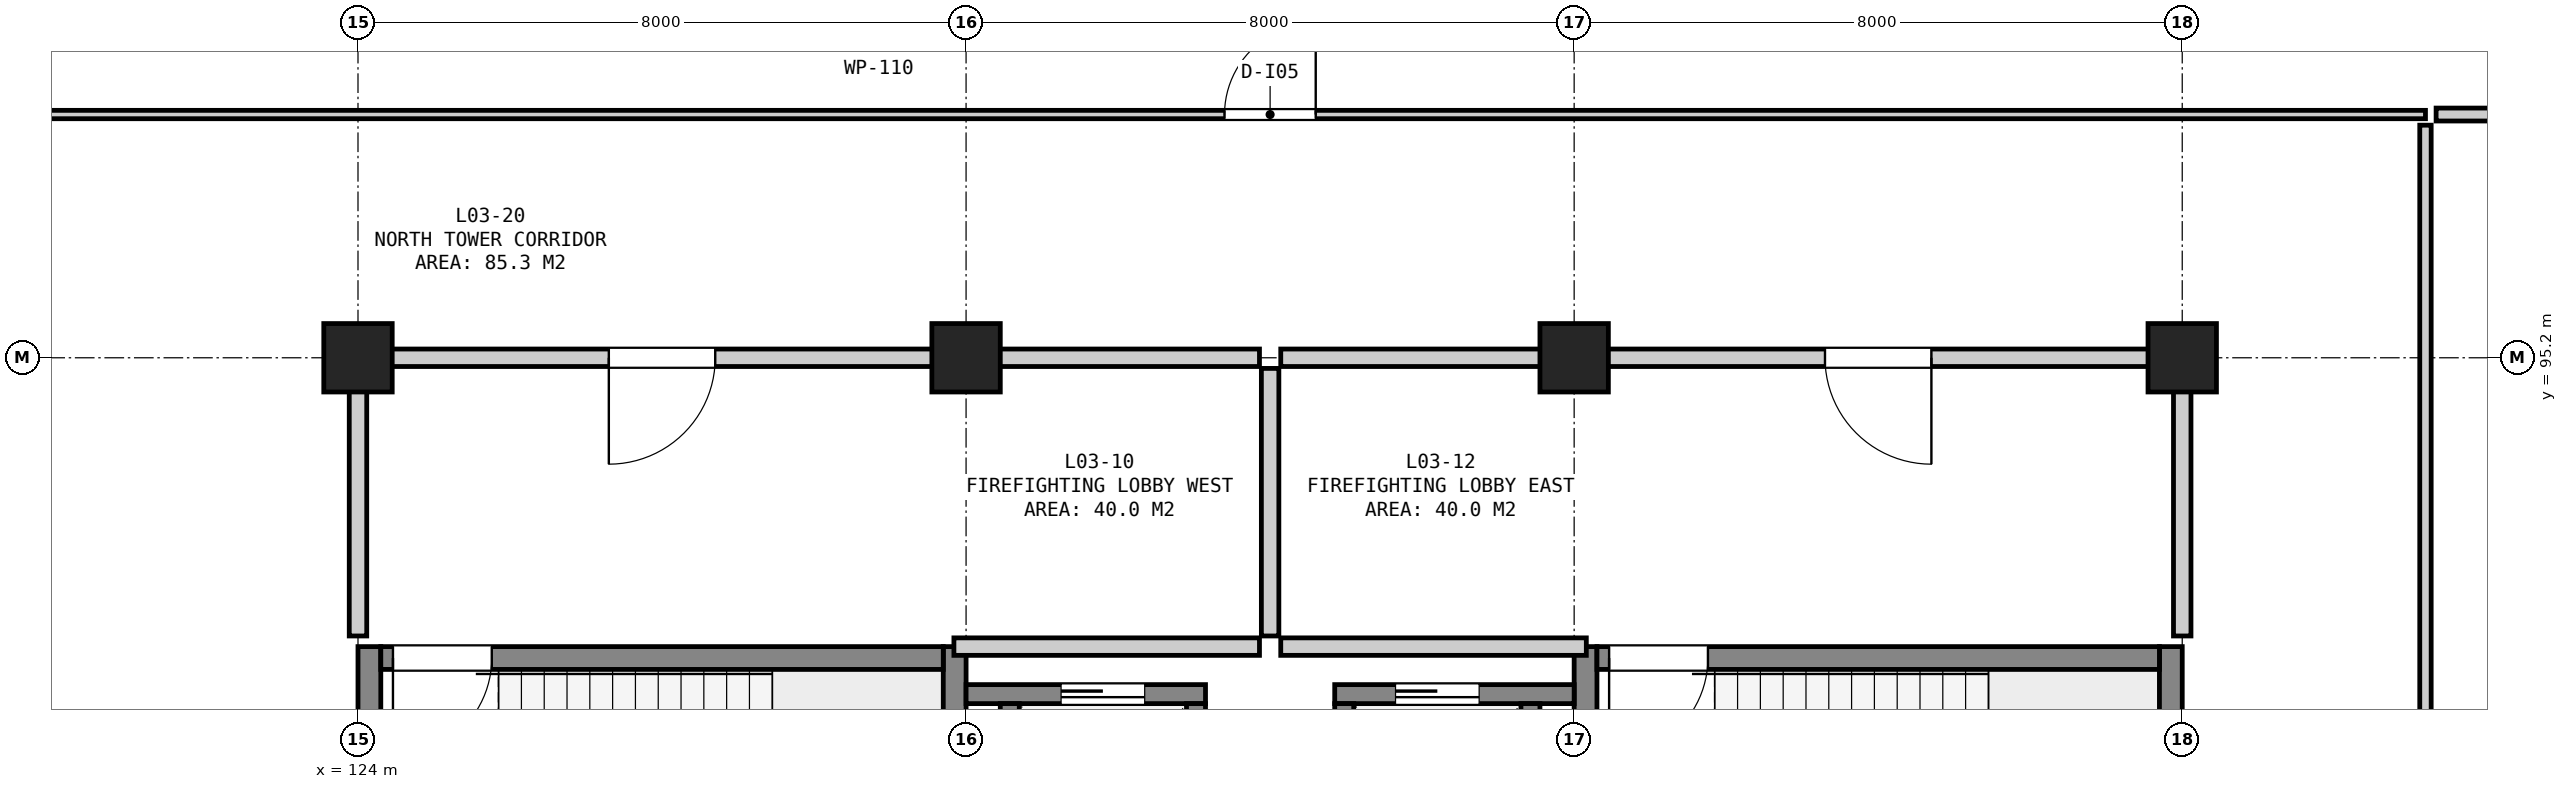
"""IFC4 building model, lengths in metres.
Left out: names, types, materials, properties, quantities, classifications, styles, units other than length and angle.
Written with IfcOpenShell. Run it as: python <this file> out.ifc"""

import sys

from ifc_helpers import new_model, si_unit, direction, frame, frame_2d, origin, origin_2d, place, context, subcontext, project, spatial, rectangle, extrude, element, fill, save


model = new_model("IFC4")
c1 = context("Model", 3, precision=1e-05, world=origin(), true_north=direction((0.0, 1.0)))
c2 = subcontext(c1, "Body", "Model", "MODEL_VIEW")
j1 = project(units=[si_unit("LENGTHUNIT", "METRE"), si_unit("PLANEANGLEUNIT", "RADIAN")], contexts=[c1])
p1 = place(None, origin())
s1 = spatial("IfcSite", under=j1, at=p1, CompositionType="ELEMENT")
p2 = place(p1, origin())
s2 = spatial("IfcBuilding", under=s1, at=p2, CompositionType="ELEMENT")
p3 = place(p2, frame((0.0, 0.0, 15.6)))
s3 = spatial("IfcBuildingStorey", under=s2, at=p3, CompositionType="ELEMENT", Elevation=15.6)
for number, where, z_axis, x_axis in (
    (1, (124.0, 95.2, 0.0), (0.0, 0.0, 1.0), (1.0, 0.0, 0.0)),
    (2, (132.0, 95.2, 0.0), (0.0, 0.0, 1.0), (1.0, 0.0, 0.0)),
    (3, (140.0, 95.2, 0.0), (0.0, 0.0, 1.0), (1.0, 0.0, 0.0)),
    (4, (148.0, 95.2, 0.0), (0.0, 0.0, 1.0), (1.0, 0.0, 0.0)),
):
    element("IfcColumn", number, at=place(p3, frame(where, z_axis=z_axis, x_axis=x_axis)), inside=s3, PredefinedType="COLUMN", context=c2, shape_type="SweptSolid", body=[
        extrude(rectangle(XDim=0.9, YDim=0.9, at=origin_2d()), origin(), (0.0, 0.0, 1.0), 4.2),
    ])
for number, where, z_axis, x_axis in (
    (5, (124.15, 87.2, 0.0), (0.0, 0.0, 1.0), (0.0, 1.0, 0.0)),
    (6, (131.85, 87.2, 0.0), (0.0, 0.0, 1.0), (0.0, 1.0, 0.0)),
):
    element("IfcWall", number, at=place(p3, frame(where, z_axis=z_axis, x_axis=x_axis)), inside=s3, PredefinedType="SHEAR", context=c2, shape_type="SweptSolid", body=[
        extrude(rectangle(XDim=4.2, YDim=0.3, at=frame_2d((2.1, 0.0))), origin(), (0.0, 0.0, 1.0), 3.9),
    ])
p4 = place(p3, frame((124.3, 91.25, 0.0), z_axis=(0.0, 0.0, 1.0), x_axis=(1.0, 0.0, 0.0)))
e7 = element("IfcWall", 7, at=p4, inside=s3, PredefinedType="SHEAR", context=c2, shape_type="SweptSolid", body=[
    extrude(rectangle(XDim=7.4, YDim=0.3, at=frame_2d((3.7, 0.0))), origin(), (0.0, 0.0, 1.0), 3.9),
])
p5 = place(p4, frame((0.16, 0.0, 0.0)))
e8 = element("IfcOpeningElement", 8, at=p5, cuts=e7, PredefinedType="OPENING", context=c2, shape_type="SweptSolid", body=[
    extrude(rectangle(XDim=1.3, YDim=2.18, at=frame_2d((0.65, 1.09))), frame((0.0, 0.162, 0.0), z_axis=(0.0, -1.0, 0.0), x_axis=(1.0, 0.0, 0.0)), (0.0, 0.0, 1.0), 0.324),
])
for number, where, z_axis, x_axis in (
    (9, (140.15, 87.2, 0.0), (0.0, 0.0, 1.0), (0.0, 1.0, 0.0)),
    (10, (147.85, 87.2, 0.0), (0.0, 0.0, 1.0), (0.0, 1.0, 0.0)),
):
    element("IfcWall", number, at=place(p3, frame(where, z_axis=z_axis, x_axis=x_axis)), inside=s3, PredefinedType="SHEAR", context=c2, shape_type="SweptSolid", body=[
        extrude(rectangle(XDim=4.2, YDim=0.3, at=frame_2d((2.1, 0.0))), origin(), (0.0, 0.0, 1.0), 3.9),
    ])
p6 = place(p3, frame((140.3, 91.25, 0.0), z_axis=(0.0, 0.0, 1.0), x_axis=(1.0, 0.0, 0.0)))
e11 = element("IfcWall", 11, at=p6, inside=s3, PredefinedType="SHEAR", context=c2, shape_type="SweptSolid", body=[
    extrude(rectangle(XDim=7.4, YDim=0.3, at=frame_2d((3.7, 0.0))), origin(), (0.0, 0.0, 1.0), 3.9),
])
p7 = place(p6, frame((0.16, 0.0, 0.0)))
e12 = element("IfcOpeningElement", 12, at=p7, cuts=e11, PredefinedType="OPENING", context=c2, shape_type="SweptSolid", body=[
    extrude(rectangle(XDim=1.3, YDim=2.18, at=frame_2d((0.65, 1.09))), frame((0.0, 0.162, 0.0), z_axis=(0.0, -1.0, 0.0), x_axis=(1.0, 0.0, 0.0)), (0.0, 0.0, 1.0), 0.324),
])
p8 = place(p3, frame((132.0, 90.775, 0.0), z_axis=(0.0, 0.0, 1.0), x_axis=(1.0, 0.0, 0.0)))
e13 = element("IfcWall", 13, at=p8, inside=s3, PredefinedType="SHEAR", context=c2, shape_type="SweptSolid", body=[
    extrude(rectangle(XDim=3.15, YDim=0.25, at=frame_2d((1.575, 0.0))), origin(), (0.0, 0.0, 1.0), 3.9),
])
p9 = place(p8, frame((1.25, 0.0, 0.0)))
e14 = element("IfcOpeningElement", 14, at=p9, cuts=e13, PredefinedType="OPENING", context=c2, shape_type="SweptSolid", body=[
    extrude(rectangle(XDim=1.1, YDim=2.15, at=frame_2d((0.55, 1.075))), frame((0.0, 0.137, 0.0), z_axis=(0.0, -1.0, 0.0), x_axis=(1.0, 0.0, 0.0)), (0.0, 0.0, 1.0), 0.274),
])
for number, where, z_axis, x_axis in (
    (15, (132.575, 87.75, 0.0), (0.0, 0.0, 1.0), (0.0, 1.0, 0.0)),
    (16, (135.025, 87.75, 0.0), (0.0, 0.0, 1.0), (0.0, 1.0, 0.0)),
):
    element("IfcWall", number, at=place(p3, frame(where, z_axis=z_axis, x_axis=x_axis)), inside=s3, PredefinedType="SHEAR", context=c2, shape_type="SweptSolid", body=[
        extrude(rectangle(XDim=2.9, YDim=0.25, at=frame_2d((1.45, 0.0))), origin(), (0.0, 0.0, 1.0), 3.9),
    ])
p10 = place(p3, frame((136.85, 90.775, 0.0), z_axis=(0.0, 0.0, 1.0), x_axis=(1.0, 0.0, 0.0)))
e17 = element("IfcWall", 17, at=p10, inside=s3, PredefinedType="SHEAR", context=c2, shape_type="SweptSolid", body=[
    extrude(rectangle(XDim=3.15, YDim=0.25, at=frame_2d((1.575, 0.0))), origin(), (0.0, 0.0, 1.0), 3.9),
])
p11 = place(p10, frame((0.8, 0.0, 0.0)))
e18 = element("IfcOpeningElement", 18, at=p11, cuts=e17, PredefinedType="OPENING", context=c2, shape_type="SweptSolid", body=[
    extrude(rectangle(XDim=1.1, YDim=2.15, at=frame_2d((0.55, 1.075))), frame((0.0, 0.137, 0.0), z_axis=(0.0, -1.0, 0.0), x_axis=(1.0, 0.0, 0.0)), (0.0, 0.0, 1.0), 0.274),
])
for number, where, z_axis, x_axis in (
    (19, (136.975, 87.75, 0.0), (0.0, 0.0, 1.0), (0.0, 1.0, 0.0)),
    (20, (139.425, 87.75, 0.0), (0.0, 0.0, 1.0), (0.0, 1.0, 0.0)),
):
    element("IfcWall", number, at=place(p3, frame(where, z_axis=z_axis, x_axis=x_axis)), inside=s3, PredefinedType="SHEAR", context=c2, shape_type="SweptSolid", body=[
        extrude(rectangle(XDim=2.9, YDim=0.25, at=frame_2d((1.45, 0.0))), origin(), (0.0, 0.0, 1.0), 3.9),
    ])
p12 = place(p3, frame((131.84, 91.4, 0.0), z_axis=(0.0, 0.0, 1.0), x_axis=(1.0, 0.0, 0.0)))
e21 = element("IfcWall", 21, at=p12, inside=s3, PredefinedType="SOLIDWALL", context=c2, shape_type="SweptSolid", body=[
    extrude(rectangle(XDim=4.02, YDim=0.23, at=frame_2d((2.01, 0.0))), origin(), (0.0, 0.0, 1.0), 3.9),
])
p13 = place(p3, frame((124.14, 95.2, 0.0), z_axis=(0.0, 0.0, 1.0), x_axis=(1.0, 0.0, 0.0)))
e22 = element("IfcWall", 22, at=p13, inside=s3, PredefinedType="SOLIDWALL", context=c2, shape_type="SweptSolid", body=[
    extrude(rectangle(XDim=11.72, YDim=0.23, at=frame_2d((5.86, 0.0))), origin(), (0.0, 0.0, 1.0), 3.195),
])
p14 = place(p13, frame((3.16, 0.0, 0.0)))
e23 = element("IfcOpeningElement", 23, at=p14, cuts=e22, PredefinedType="OPENING", context=c2, shape_type="SweptSolid", body=[
    extrude(rectangle(XDim=1.4, YDim=2.2, at=frame_2d((0.7, 1.1))), frame((0.0, 0.127, 0.0), z_axis=(0.0, -1.0, 0.0), x_axis=(1.0, 0.0, 0.0)), (0.0, 0.0, 1.0), 0.254),
])
p15 = place(p3, frame((124.0, 91.54, 0.0), z_axis=(0.0, 0.0, 1.0), x_axis=(0.0, 1.0, 0.0)))
e24 = element("IfcWall", 24, at=p15, inside=s3, PredefinedType="SOLIDWALL", context=c2, shape_type="SweptSolid", body=[
    extrude(rectangle(XDim=3.52, YDim=0.23, at=frame_2d((1.76, 0.0))), origin(), (0.0, 0.0, 1.0), 3.145),
])
p16 = place(p3, frame((136.0, 91.54, 0.0), z_axis=(0.0, 0.0, 1.0), x_axis=(0.0, 1.0, 0.0)))
e25 = element("IfcWall", 25, at=p16, inside=s3, PredefinedType="SOLIDWALL", context=c2, shape_type="SweptSolid", body=[
    extrude(rectangle(XDim=3.52, YDim=0.23, at=frame_2d((1.76, 0.0))), origin(), (0.0, 0.0, 1.0), 3.9),
])
p17 = place(p3, frame((136.14, 91.4, 0.0), z_axis=(0.0, 0.0, 1.0), x_axis=(1.0, 0.0, 0.0)))
e26 = element("IfcWall", 26, at=p17, inside=s3, PredefinedType="SOLIDWALL", context=c2, shape_type="SweptSolid", body=[
    extrude(rectangle(XDim=4.02, YDim=0.23, at=frame_2d((2.01, 0.0))), origin(), (0.0, 0.0, 1.0), 3.9),
])
p18 = place(p3, frame((136.14, 95.2, 0.0), z_axis=(0.0, 0.0, 1.0), x_axis=(1.0, 0.0, 0.0)))
e27 = element("IfcWall", 27, at=p18, inside=s3, PredefinedType="SOLIDWALL", context=c2, shape_type="SweptSolid", body=[
    extrude(rectangle(XDim=11.72, YDim=0.23, at=frame_2d((5.86, 0.0))), origin(), (0.0, 0.0, 1.0), 3.245),
])
p19 = place(p18, frame((7.16, 0.0, 0.0)))
e28 = element("IfcOpeningElement", 28, at=p19, cuts=e27, PredefinedType="OPENING", context=c2, shape_type="SweptSolid", body=[
    extrude(rectangle(XDim=1.4, YDim=2.2, at=frame_2d((0.7, 1.1))), frame((0.0, 0.127, 0.0), z_axis=(0.0, -1.0, 0.0), x_axis=(1.0, 0.0, 0.0)), (0.0, 0.0, 1.0), 0.254),
])
p20 = place(p3, frame((148.0, 91.54, 0.0), z_axis=(0.0, 0.0, 1.0), x_axis=(0.0, 1.0, 0.0)))
e29 = element("IfcWall", 29, at=p20, inside=s3, PredefinedType="SOLIDWALL", context=c2, shape_type="SweptSolid", body=[
    extrude(rectangle(XDim=3.52, YDim=0.23, at=frame_2d((1.76, 0.0))), origin(), (0.0, 0.0, 1.0), 3.095),
])
p21 = place(p3, frame((151.34, 98.4, 0.0), z_axis=(0.0, 0.0, 1.0), x_axis=(1.0, 0.0, 0.0)))
e30 = element("IfcWall", 30, at=p21, inside=s3, PredefinedType="PARTITIONING", context=c2, shape_type="SweptSolid", body=[
    extrude(rectangle(XDim=16.555, YDim=0.17, at=frame_2d((8.277, 0.0))), origin(), (0.0, 0.0, 1.0), 3.9),
])
p22 = place(p3, frame((151.2, 76.14, 0.0), z_axis=(0.0, 0.0, 1.0), x_axis=(0.0, 1.0, 0.0)))
e31 = element("IfcWall", 31, at=p22, inside=s3, PredefinedType="PARTITIONING", context=c2, shape_type="SweptSolid", body=[
    extrude(rectangle(XDim=22.12, YDim=0.15, at=frame_2d((11.06, 0.0))), origin(), (0.0, 0.0, 1.0), 3.9),
])
p23 = place(p22, frame((10.46, 0.0, 0.0)))
e32 = element("IfcOpeningElement", 32, at=p23, cuts=e31, PredefinedType="OPENING", context=c2, shape_type="SweptSolid", body=[
    extrude(rectangle(XDim=1.2, YDim=2.15, at=frame_2d((0.6, 1.075))), frame((0.0, 0.087, 0.0), z_axis=(0.0, -1.0, 0.0), x_axis=(1.0, 0.0, 0.0)), (0.0, 0.0, 1.0), 0.174),
])
p24 = place(p3, frame((110.505, 98.4, 0.0), z_axis=(0.0, 0.0, 1.0), x_axis=(1.0, 0.0, 0.0)))
e33 = element("IfcWall", 33, at=p24, inside=s3, PredefinedType="PARTITIONING", context=c2, shape_type="SweptSolid", body=[
    extrude(rectangle(XDim=40.695, YDim=0.11, at=frame_2d((20.348, 0.0))), origin(), (0.0, 0.0, 1.0), 3.9),
])
p25 = place(p24, frame((24.895, 0.0, 0.0)))
e34 = element("IfcOpeningElement", 34, at=p25, cuts=e33, PredefinedType="OPENING", context=c2, shape_type="SweptSolid", body=[
    extrude(rectangle(XDim=1.2, YDim=2.15, at=frame_2d((0.6, 1.075))), frame((0.0, 0.067, 0.0), z_axis=(0.0, -1.0, 0.0), x_axis=(1.0, 0.0, 0.0)), (0.0, 0.0, 1.0), 0.134),
])
p26 = place(p5, frame((1.3, 0.0, 0.0), z_axis=(0.0, 0.0, 1.0), x_axis=(-1.0, 0.0, 0.0)))
e35 = element("IfcDoor", 35, at=p26, inside=s3, OperationType="SINGLE_SWING_RIGHT", PredefinedType="DOOR", context=c2, shape_type="SweptSolid", body=[
    extrude(rectangle(XDim=1.3, YDim=2.18, at=frame_2d((0.65, 1.09))), frame((0.0, 0.025, 0.0), z_axis=(0.0, -1.0, 0.0), x_axis=(1.0, 0.0, 0.0)), (0.0, 0.0, 1.0), 0.05),
])
fill(e8, e35)
p27 = place(p7, frame((1.3, 0.0, 0.0), z_axis=(0.0, 0.0, 1.0), x_axis=(-1.0, 0.0, 0.0)))
e36 = element("IfcDoor", 36, at=p27, inside=s3, OperationType="SINGLE_SWING_RIGHT", PredefinedType="DOOR", context=c2, shape_type="SweptSolid", body=[
    extrude(rectangle(XDim=1.3, YDim=2.18, at=frame_2d((0.65, 1.09))), frame((0.0, 0.025, 0.0), z_axis=(0.0, -1.0, 0.0), x_axis=(1.0, 0.0, 0.0)), (0.0, 0.0, 1.0), 0.05),
])
fill(e12, e36)
p28 = place(p9, origin())
e37 = element("IfcDoor", 37, at=p28, inside=s3, OperationType="SLIDING_TO_LEFT", PredefinedType="DOOR", context=c2, shape_type="SweptSolid", body=[
    extrude(rectangle(XDim=1.1, YDim=2.15, at=frame_2d((0.55, 1.075))), frame((0.0, 0.025, 0.0), z_axis=(0.0, -1.0, 0.0), x_axis=(1.0, 0.0, 0.0)), (0.0, 0.0, 1.0), 0.05),
])
fill(e14, e37)
p29 = place(p11, origin())
e38 = element("IfcDoor", 38, at=p29, inside=s3, OperationType="SLIDING_TO_LEFT", PredefinedType="DOOR", context=c2, shape_type="SweptSolid", body=[
    extrude(rectangle(XDim=1.1, YDim=2.15, at=frame_2d((0.55, 1.075))), frame((0.0, 0.025, 0.0), z_axis=(0.0, -1.0, 0.0), x_axis=(1.0, 0.0, 0.0)), (0.0, 0.0, 1.0), 0.05),
])
fill(e18, e38)
p30 = place(p14, frame((1.4, 0.0, 0.0), z_axis=(0.0, 0.0, 1.0), x_axis=(-1.0, 0.0, 0.0)))
e39 = element("IfcDoor", 39, at=p30, inside=s3, OperationType="SINGLE_SWING_RIGHT", PredefinedType="DOOR", context=c2, shape_type="SweptSolid", body=[
    extrude(rectangle(XDim=1.4, YDim=2.2, at=frame_2d((0.7, 1.1))), frame((0.0, 0.025, 0.0), z_axis=(0.0, -1.0, 0.0), x_axis=(1.0, 0.0, 0.0)), (0.0, 0.0, 1.0), 0.05),
])
fill(e23, e39)
p31 = place(p19, frame((1.4, 0.0, 0.0), z_axis=(0.0, 0.0, 1.0), x_axis=(-1.0, 0.0, 0.0)))
e40 = element("IfcDoor", 40, at=p31, inside=s3, OperationType="SINGLE_SWING_LEFT", PredefinedType="DOOR", context=c2, shape_type="SweptSolid", body=[
    extrude(rectangle(XDim=1.4, YDim=2.2, at=frame_2d((0.7, 1.1))), frame((0.0, 0.025, 0.0), z_axis=(0.0, -1.0, 0.0), x_axis=(1.0, 0.0, 0.0)), (0.0, 0.0, 1.0), 0.05),
])
fill(e28, e40)
p32 = place(p25, origin())
e41 = element("IfcDoor", 41, at=p32, inside=s3, OperationType="SINGLE_SWING_RIGHT", PredefinedType="DOOR", context=c2, shape_type="SweptSolid", body=[
    extrude(rectangle(XDim=1.2, YDim=2.15, at=frame_2d((0.6, 1.075))), frame((0.0, 0.025, 0.0), z_axis=(0.0, -1.0, 0.0), x_axis=(1.0, 0.0, 0.0)), (0.0, 0.0, 1.0), 0.05),
])
fill(e34, e41)
save(model, sys.argv[1])
